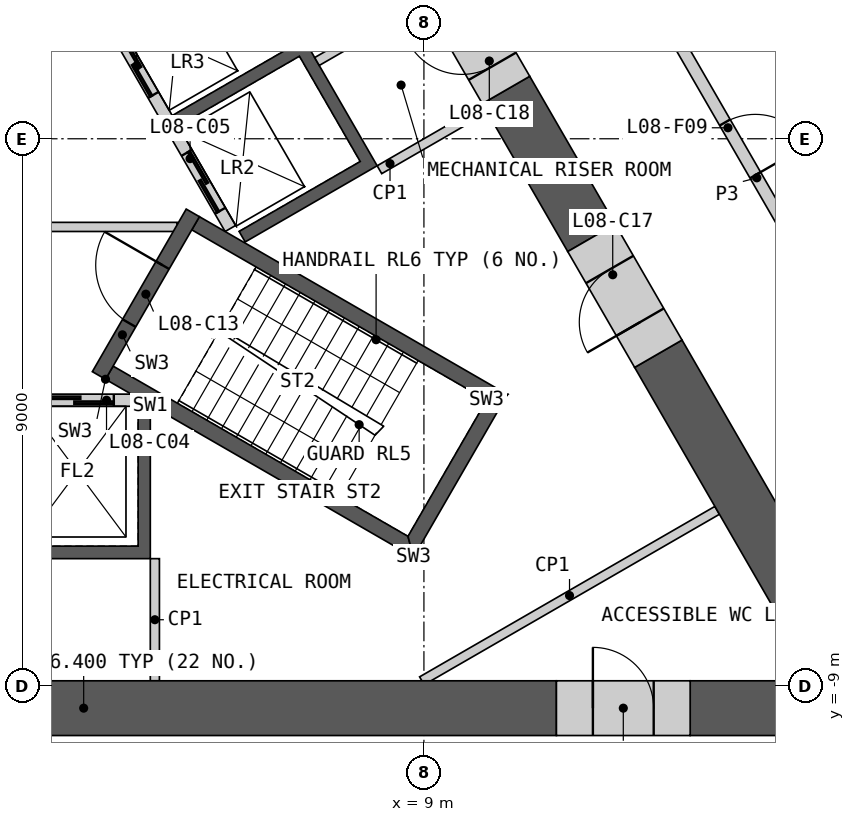
"""IFC4 building model, lengths in metres.
Left out: names, types, materials, properties, quantities, classifications, styles, units other than length and angle.
Written with IfcOpenShell. Run it as: python <this file> out.ifc"""

import sys

from ifc_helpers import new_model, si_unit, direction, frame, frame_2d, origin, place, context, subcontext, project, spatial, polyline, rectangle, outline, extrude, element, fill, save


model = new_model("IFC4")
c1 = context("Model", 3, precision=1e-05, world=origin(), true_north=direction((0.0, 1.0)))
c2 = subcontext(c1, "Body", "Model", "MODEL_VIEW")
j1 = project(units=[si_unit("LENGTHUNIT", "METRE"), si_unit("PLANEANGLEUNIT", "RADIAN")], contexts=[c1])
p1 = place(None, origin())
s1 = spatial("IfcSite", under=j1, at=p1, CompositionType="ELEMENT")
p2 = place(p1, origin())
s2 = spatial("IfcBuilding", under=s1, at=p2, CompositionType="ELEMENT")
p3 = place(p2, frame((0.0, 0.0, 42.6)))
s3 = spatial("IfcBuildingStorey", under=s2, at=p3, CompositionType="ELEMENT", Elevation=42.6)
p4 = place(p3, origin())
e1 = element("IfcWall", 1, at=p4, inside=s3, PredefinedType="SHEAR", context=c2, shape_type="SweptSolid", body=[
    extrude(outline(polyline([(4.5, -4.4), (4.5, -6.906), (-4.5, -6.906), (-4.5, -4.4), (-4.3, -4.4), (-4.3, -6.7), (-2.3, -6.7), (-2.3, -4.4), (-2.1, -4.4), (-2.1, -6.7), (-0.1, -6.7), (-0.1, -4.4), (0.1, -4.4), (0.1, -6.7), (2.1, -6.7), (2.1, -4.4), (2.3, -4.4), (2.3, -6.7), (4.3, -6.7), (4.3, -4.4), (4.5, -4.4)])), origin(), (0.0, 0.0, 1.0), 3.8),
])
p5 = place(p3, frame((-4.187, -4.3, 0.0), z_axis=(0.0, 0.0, 1.0), x_axis=(1.0, 0.0, 0.0)))
e2 = element("IfcWall", 2, at=p5, inside=s3, PredefinedType="SOLIDWALL", context=c2, shape_type="SweptSolid", body=[
    extrude(rectangle(XDim=8.373, YDim=0.2, at=frame_2d((4.187, 0.0))), origin(), (0.0, 0.0, 1.0), 3.8),
])
p6 = place(p5, frame((0.287, 0.0, 0.0)))
e3 = element("IfcOpeningElement", 3, at=p6, cuts=e2, PredefinedType="OPENING", context=c2, shape_type="SweptSolid", body=[
    extrude(rectangle(XDim=1.2, YDim=2.1, at=frame_2d((0.6, 1.05))), frame((0.0, 0.11, 0.0), z_axis=(0.0, -1.0, 0.0), x_axis=(1.0, 0.0, 0.0)), (0.0, 0.0, 1.0), 0.22),
])
p7 = place(p5, frame((2.387, 0.0, 0.0)))
e4 = element("IfcOpeningElement", 4, at=p7, cuts=e2, PredefinedType="OPENING", context=c2, shape_type="SweptSolid", body=[
    extrude(rectangle(XDim=1.4, YDim=2.1, at=frame_2d((0.7, 1.05))), frame((0.0, 0.11, 0.0), z_axis=(0.0, -1.0, 0.0), x_axis=(1.0, 0.0, 0.0)), (0.0, 0.0, 1.0), 0.22),
])
p8 = place(p5, frame((4.737, 0.0, 0.0)))
e5 = element("IfcOpeningElement", 5, at=p8, cuts=e2, PredefinedType="OPENING", context=c2, shape_type="SweptSolid", body=[
    extrude(rectangle(XDim=1.1, YDim=2.1, at=frame_2d((0.55, 1.05))), frame((0.0, 0.11, 0.0), z_axis=(0.0, -1.0, 0.0), x_axis=(1.0, 0.0, 0.0)), (0.0, 0.0, 1.0), 0.22),
])
p9 = place(p5, frame((6.887, 0.0, 0.0)))
e6 = element("IfcOpeningElement", 6, at=p9, cuts=e2, PredefinedType="OPENING", context=c2, shape_type="SweptSolid", body=[
    extrude(rectangle(XDim=1.2, YDim=2.1, at=frame_2d((0.6, 1.05))), frame((0.0, 0.11, 0.0), z_axis=(0.0, -1.0, 0.0), x_axis=(1.0, 0.0, 0.0)), (0.0, 0.0, 1.0), 0.22),
])
p10 = place(p3, origin())
e7 = element("IfcWall", 7, at=p10, inside=s3, PredefinedType="SHEAR", context=c2, shape_type="SweptSolid", body=[
    extrude(outline(polyline([(2.66, 4.192), (4.831, 5.445), (8.231, -0.444), (6.061, -1.697), (5.96, -1.524), (7.952, -0.374), (6.952, 1.358), (4.96, 0.208), (4.861, 0.381), (6.852, 1.531), (5.852, 3.263), (3.861, 2.113), (3.76, 2.287), (5.752, 3.437), (4.752, 5.169), (2.76, 4.019), (2.66, 4.192)])), origin(), (0.0, 0.0, 1.0), 3.8),
])
p11 = place(p3, frame((5.817, -1.476, 0.0), z_axis=(0.0, 0.0, 1.0), x_axis=(-0.500002616675, 0.866023893041, 0.0)))
e8 = element("IfcWall", 8, at=p11, inside=s3, PredefinedType="SOLIDWALL", context=c2, shape_type="SweptSolid", body=[
    extrude(rectangle(XDim=8.373, YDim=0.2, at=frame_2d((4.187, 0.0))), origin(), (0.0, 0.0, 1.0), 3.8),
])
p12 = place(p11, frame((0.337, 0.0, 0.0)))
e9 = element("IfcOpeningElement", 9, at=p12, cuts=e8, PredefinedType="OPENING", context=c2, shape_type="SweptSolid", body=[
    extrude(rectangle(XDim=1.1, YDim=2.1, at=frame_2d((0.55, 1.05))), frame((0.0, 0.11, 0.0), z_axis=(0.0, -1.0, 0.0), x_axis=(1.0, 0.0, 0.0)), (0.0, 0.0, 1.0), 0.22),
])
p13 = place(p11, frame((2.537, 0.0, 0.0)))
e10 = element("IfcOpeningElement", 10, at=p13, cuts=e8, PredefinedType="OPENING", context=c2, shape_type="SweptSolid", body=[
    extrude(rectangle(XDim=1.1, YDim=2.1, at=frame_2d((0.55, 1.05))), frame((0.0, 0.11, 0.0), z_axis=(0.0, -1.0, 0.0), x_axis=(1.0, 0.0, 0.0)), (0.0, 0.0, 1.0), 0.22),
])
p14 = place(p11, frame((4.737, 0.0, 0.0)))
e11 = element("IfcOpeningElement", 11, at=p14, cuts=e8, PredefinedType="OPENING", context=c2, shape_type="SweptSolid", body=[
    extrude(rectangle(XDim=1.1, YDim=2.1, at=frame_2d((0.55, 1.05))), frame((0.0, 0.11, 0.0), z_axis=(0.0, -1.0, 0.0), x_axis=(1.0, 0.0, 0.0)), (0.0, 0.0, 1.0), 0.22),
])
p15 = place(p11, frame((7.037, 0.0, 0.0)))
e12 = element("IfcOpeningElement", 12, at=p15, cuts=e8, PredefinedType="OPENING", context=c2, shape_type="SweptSolid", body=[
    extrude(rectangle(XDim=0.9, YDim=2.1, at=frame_2d((0.45, 1.05))), frame((0.0, 0.11, 0.0), z_axis=(0.0, -1.0, 0.0), x_axis=(1.0, 0.0, 0.0)), (0.0, 0.0, 1.0), 0.22),
])
p16 = place(p3, frame((-4.941, -1.45, 0.0), z_axis=(0.0, 0.0, 1.0), x_axis=(1.0, 0.0, 0.0)))
e13 = element("IfcWall", 13, at=p16, inside=s3, PredefinedType="PARTITIONING", context=c2, shape_type="SweptSolid", body=[
    extrude(rectangle(XDim=9.882, YDim=0.15, at=frame_2d((4.941, 0.0))), origin(), (0.0, 0.0, 1.0), 3.8),
])
p17 = place(p16, frame((4.391, 0.0, 0.0)))
e14 = element("IfcOpeningElement", 14, at=p17, cuts=e13, PredefinedType="OPENING", context=c2, shape_type="SweptSolid", body=[
    extrude(rectangle(XDim=1.1, YDim=2.1, at=frame_2d((0.55, 1.05))), frame((0.0, 0.085, 0.0), z_axis=(0.0, -1.0, 0.0), x_axis=(1.0, 0.0, 0.0)), (0.0, 0.0, 1.0), 0.17),
])
p18 = place(p3, origin())
e15 = element("IfcWall", 15, at=p18, inside=s3, PredefinedType="SHEAR", context=c2, shape_type="SweptSolid", body=[
    extrude(outline(polyline([(3.763, -3.956), (8.83, -6.881), (8.738, -6.539), (3.888, -3.739), (3.763, -3.956)])), origin(), (0.0, 0.0, 1.0), 3.8),
])
p19 = place(p3, origin())
e16 = element("IfcWall", 16, at=p19, inside=s3, PredefinedType="SHEAR", context=c2, shape_type="SweptSolid", body=[
    extrude(outline(polyline([(8.83, -6.881), (10.374, -4.206), (10.032, -4.298), (8.738, -6.539), (8.83, -6.881)])), origin(), (0.0, 0.0, 1.0), 3.8),
])
p20 = place(p3, origin())
e17 = element("IfcWall", 17, at=p20, inside=s3, PredefinedType="SHEAR", context=c2, shape_type="SweptSolid", body=[
    extrude(outline(polyline([(10.032, -4.298), (10.374, -4.206), (5.307, -1.281), (5.182, -1.498), (10.032, -4.298)])), origin(), (0.0, 0.0, 1.0), 3.8),
])
p21 = place(p3, frame((3.655, -3.893, 0.0), z_axis=(0.0, 0.0, 1.0), x_axis=(0.499982516597, 0.866035497597, 0.0)))
e18 = element("IfcWall", 18, at=p21, inside=s3, PredefinedType="SHEAR", context=c2, shape_type="SweptSolid", body=[
    extrude(rectangle(XDim=3.088, YDim=0.25, at=frame_2d((1.544, 0.0))), origin(), (0.0, 0.0, 1.0), 3.8),
])
p22 = place(p21, frame((0.994, 0.0, 0.0)))
e19 = element("IfcOpeningElement", 19, at=p22, cuts=e18, PredefinedType="OPENING", context=c2, shape_type="SweptSolid", body=[
    extrude(rectangle(XDim=1.1, YDim=2.1, at=frame_2d((0.55, 1.05))), frame((0.0, 0.135, 0.0), z_axis=(0.0, -1.0, 0.0), x_axis=(1.0, 0.0, 0.0)), (0.0, 0.0, 1.0), 0.27),
])
p23 = place(p3, frame((4.575, -6.906, 0.0), z_axis=(0.0, 0.0, 1.0), x_axis=(0.0, -1.0, 0.0)))
e20 = element("IfcWall", 20, at=p23, inside=s3, PredefinedType="PARTITIONING", context=c2, shape_type="SweptSolid", body=[
    extrude(rectangle(XDim=2.009, YDim=0.15, at=frame_2d((1.004, 0.0))), origin(), (0.0, 0.0, 1.0), 3.8),
])
p24 = place(p3, frame((8.268, -0.509, 0.0), z_axis=(0.0, 0.0, 1.0), x_axis=(0.866035824272, 0.499981950752, 0.0)))
e21 = element("IfcWall", 21, at=p24, inside=s3, PredefinedType="PARTITIONING", context=c2, shape_type="SweptSolid", body=[
    extrude(rectangle(XDim=2.009, YDim=0.15, at=frame_2d((1.004, 0.0))), origin(), (0.0, 0.0, 1.0), 3.8),
])
p25 = place(p3, frame((13.823, -6.111, 0.0), z_axis=(0.0, 0.0, 1.0), x_axis=(-0.866026802741, -0.499997576928, 0.0)))
e22 = element("IfcWall", 22, at=p25, inside=s3, PredefinedType="PARTITIONING", context=c2, shape_type="SweptSolid", body=[
    extrude(rectangle(XDim=5.607, YDim=0.15, at=frame_2d((2.804, 0.0))), origin(), (0.0, 0.0, 1.0), 3.8),
])
p26 = place(p3, frame((8.981, 2.275, 0.0), z_axis=(0.0, 0.0, 1.0), x_axis=(-0.866013584312, -0.500020471368, 0.0)))
e23 = element("IfcWall", 23, at=p26, inside=s3, PredefinedType="PARTITIONING", context=c2, shape_type="SweptSolid", body=[
    extrude(rectangle(XDim=2.009, YDim=0.15, at=frame_2d((1.005, 0.0))), origin(), (0.0, 0.0, 1.0), 3.8),
])
p27 = place(p3, frame((-4.371, -9.365, 0.0), z_axis=(0.0, 0.0, 1.0), x_axis=(1.0, 0.0, 0.0)))
e24 = element("IfcWall", 24, at=p27, inside=s3, PredefinedType="SHEAR", context=c2, shape_type="SweptSolid", body=[
    extrude(rectangle(XDim=15.55, YDim=0.9, at=frame_2d((7.775, 0.0))), origin(), (0.0, 0.0, 1.0), 3.8),
])
p28 = place(p3, frame((13.379, -9.365, 0.0), z_axis=(0.0, 0.0, 1.0), x_axis=(1.0, 0.0, 0.0)))
e25 = element("IfcWall", 25, at=p28, inside=s3, PredefinedType="SHEAR", context=c2, shape_type="SweptSolid", body=[
    extrude(rectangle(XDim=2.062, YDim=0.9, at=frame_2d((1.031, 0.0))), origin(), (0.0, 0.0, 1.0), 3.8),
])
p29 = place(p3, frame((15.831, -8.69, 0.0), z_axis=(0.0, 0.0, 1.0), x_axis=(-0.499999419053, 0.866025739194, 0.0)))
e26 = element("IfcWall", 26, at=p29, inside=s3, PredefinedType="SHEAR", context=c2, shape_type="SweptSolid", body=[
    extrude(rectangle(XDim=5.952, YDim=0.9, at=frame_2d((2.976, 0.0))), origin(), (0.0, 0.0, 1.0), 3.8),
])
p30 = place(p3, frame((11.755, -1.63, 0.0), z_axis=(0.0, 0.0, 1.0), x_axis=(-0.499943114462, 0.866058244174, 0.0)))
e27 = element("IfcWall", 27, at=p30, inside=s3, PredefinedType="SHEAR", context=c2, shape_type="SweptSolid", body=[
    extrude(rectangle(XDim=2.809, YDim=0.9, at=frame_2d((1.405, 0.0))), origin(), (0.0, 0.0, 1.0), 3.8),
])
p31 = place(p3, frame((11.179, -9.365, 0.0), z_axis=(0.0, 0.0, 1.0), x_axis=(1.0, 0.0, 0.0)))
e28 = element("IfcWall", 28, at=p31, inside=s3, PredefinedType="SHEAR", context=c2, shape_type="SweptSolid", body=[
    extrude(rectangle(XDim=2.2, YDim=0.9, at=frame_2d((1.1, 0.0))), origin(), (0.0, 0.0, 1.0), 3.8),
])
p32 = place(p31, frame((0.6, 0.0, 0.0)))
e29 = element("IfcOpeningElement", 29, at=p32, cuts=e28, PredefinedType="OPENING", context=c2, shape_type="SweptSolid", body=[
    extrude(rectangle(XDim=1.0, YDim=2.1, at=frame_2d((0.5, 1.05))), frame((0.0, 0.46, 0.0), z_axis=(0.0, -1.0, 0.0), x_axis=(1.0, 0.0, 0.0)), (0.0, 0.0, 1.0), 0.92),
])
p33 = place(p3, frame((12.855, -3.536, 0.0), z_axis=(0.0, 0.0, 1.0), x_axis=(-0.50002983664, 0.866008176907, 0.0)))
e30 = element("IfcWall", 30, at=p33, inside=s3, PredefinedType="SHEAR", context=c2, shape_type="SweptSolid", body=[
    extrude(rectangle(XDim=2.2, YDim=0.9, at=frame_2d((1.1, 0.0))), origin(), (0.0, 0.0, 1.0), 3.8),
])
p34 = place(p33, frame((0.6, 0.0, 0.0)))
e31 = element("IfcOpeningElement", 31, at=p34, cuts=e30, PredefinedType="OPENING", context=c2, shape_type="SweptSolid", body=[
    extrude(rectangle(XDim=1.0, YDim=2.1, at=frame_2d((0.5, 1.05))), frame((0.0, 0.46, 0.0), z_axis=(0.0, -1.0, 0.0), x_axis=(1.0, 0.0, 0.0)), (0.0, 0.0, 1.0), 0.92),
])
p35 = place(p3, frame((10.35, 0.803, 0.0), z_axis=(0.0, 0.0, 1.0), x_axis=(-0.500081290722, 0.865978465477, 0.0)))
e32 = element("IfcWall", 32, at=p35, inside=s3, PredefinedType="SHEAR", context=c2, shape_type="SweptSolid", body=[
    extrude(rectangle(XDim=1.865, YDim=0.9, at=frame_2d((0.933, 0.0))), origin(), (0.0, 0.0, 1.0), 3.8),
])
p36 = place(p35, frame((0.45, 0.0, 0.0)))
e33 = element("IfcOpeningElement", 33, at=p36, cuts=e32, PredefinedType="OPENING", context=c2, shape_type="SweptSolid", body=[
    extrude(rectangle(XDim=1.0, YDim=2.1, at=frame_2d((0.5, 1.05))), frame((0.0, 0.46, 0.0), z_axis=(0.0, -1.0, 0.0), x_axis=(1.0, 0.0, 0.0)), (0.0, 0.0, 1.0), 0.92),
])
p37 = place(p3, frame((10.719, 5.865, 0.0), z_axis=(0.0, 0.0, 1.0), x_axis=(0.49999175339, -0.866030164915, 0.0)))
e34 = element("IfcWall", 34, at=p37, inside=s3, PredefinedType="PARTITIONING", context=c2, shape_type="SweptSolid", body=[
    extrude(rectangle(XDim=10.019, YDim=0.2, at=frame_2d((5.009, 0.0))), origin(), (0.0, 0.0, 1.0), 3.8),
])
p38 = place(p37, frame((6.464, 0.0, 0.0)))
e35 = element("IfcOpeningElement", 35, at=p38, cuts=e34, PredefinedType="OPENING", context=c2, shape_type="SweptSolid", body=[
    extrude(rectangle(XDim=1.0, YDim=2.1, at=frame_2d((0.5, 1.05))), frame((0.0, 0.11, 0.0), z_axis=(0.0, -1.0, 0.0), x_axis=(1.0, 0.0, 0.0)), (0.0, 0.0, 1.0), 0.22),
])
p39 = place(p37, frame((1.753, 0.0, 0.0)))
e36 = element("IfcOpeningElement", 36, at=p39, cuts=e34, PredefinedType="OPENING", context=c2, shape_type="SweptSolid", body=[
    extrude(rectangle(XDim=1.0, YDim=2.1, at=frame_2d((0.5, 1.05))), frame((0.0, 0.11, 0.0), z_axis=(0.0, -1.0, 0.0), x_axis=(1.0, 0.0, 0.0)), (0.0, 0.0, 1.0), 0.22),
])
p40 = place(p9, origin())
e37 = element("IfcDoor", 37, at=p40, inside=s3, OperationType="SLIDING_TO_LEFT", PredefinedType="DOOR", context=c2, shape_type="SweptSolid", body=[
    extrude(rectangle(XDim=1.2, YDim=2.1, at=frame_2d((0.6, 1.05))), frame((0.0, 0.025, 0.0), z_axis=(0.0, -1.0, 0.0), x_axis=(1.0, 0.0, 0.0)), (0.0, 0.0, 1.0), 0.05),
])
fill(e6, e37)
p41 = place(p12, origin())
e38 = element("IfcDoor", 38, at=p41, inside=s3, OperationType="SLIDING_TO_LEFT", PredefinedType="DOOR", context=c2, shape_type="SweptSolid", body=[
    extrude(rectangle(XDim=1.1, YDim=2.1, at=frame_2d((0.55, 1.05))), frame((0.0, 0.025, 0.0), z_axis=(0.0, -1.0, 0.0), x_axis=(1.0, 0.0, 0.0)), (0.0, 0.0, 1.0), 0.05),
])
fill(e9, e38)
p42 = place(p13, origin())
e39 = element("IfcDoor", 39, at=p42, inside=s3, OperationType="SLIDING_TO_LEFT", PredefinedType="DOOR", context=c2, shape_type="SweptSolid", body=[
    extrude(rectangle(XDim=1.1, YDim=2.1, at=frame_2d((0.55, 1.05))), frame((0.0, 0.025, 0.0), z_axis=(0.0, -1.0, 0.0), x_axis=(1.0, 0.0, 0.0)), (0.0, 0.0, 1.0), 0.05),
])
fill(e10, e39)
p43 = place(p22, origin())
e40 = element("IfcDoor", 40, at=p43, inside=s3, OperationType="SINGLE_SWING_RIGHT", PredefinedType="DOOR", context=c2, shape_type="SweptSolid", body=[
    extrude(rectangle(XDim=1.1, YDim=2.1, at=frame_2d((0.55, 1.05))), frame((0.0, 0.025, 0.0), z_axis=(0.0, -1.0, 0.0), x_axis=(1.0, 0.0, 0.0)), (0.0, 0.0, 1.0), 0.05),
])
fill(e19, e40)
p44 = place(p32, origin())
e41 = element("IfcDoor", 41, at=p44, inside=s3, OperationType="SINGLE_SWING_LEFT", PredefinedType="DOOR", context=c2, shape_type="SweptSolid", body=[
    extrude(rectangle(XDim=1.0, YDim=2.1, at=frame_2d((0.5, 1.05))), frame((0.0, 0.205, 0.0), z_axis=(0.0, -1.0, 0.0), x_axis=(1.0, 0.0, 0.0)), (0.0, 0.0, 1.0), 0.05),
])
fill(e29, e41)
p45 = place(p34, origin())
e42 = element("IfcDoor", 42, at=p45, inside=s3, OperationType="SINGLE_SWING_LEFT", PredefinedType="DOOR", context=c2, shape_type="SweptSolid", body=[
    extrude(rectangle(XDim=1.0, YDim=2.1, at=frame_2d((0.5, 1.05))), frame((0.0, 0.205, 0.0), z_axis=(0.0, -1.0, 0.0), x_axis=(1.0, 0.0, 0.0)), (0.0, 0.0, 1.0), 0.05),
])
fill(e31, e42)
p46 = place(p36, origin())
e43 = element("IfcDoor", 43, at=p46, inside=s3, OperationType="SINGLE_SWING_RIGHT", PredefinedType="DOOR", context=c2, shape_type="SweptSolid", body=[
    extrude(rectangle(XDim=1.0, YDim=2.1, at=frame_2d((0.5, 1.05))), frame((0.0, 0.205, 0.0), z_axis=(0.0, -1.0, 0.0), x_axis=(1.0, 0.0, 0.0)), (0.0, 0.0, 1.0), 0.05),
])
fill(e33, e43)
p47 = place(p38, origin())
e44 = element("IfcDoor", 44, at=p47, inside=s3, OperationType="SINGLE_SWING_RIGHT", PredefinedType="DOOR", context=c2, shape_type="SweptSolid", body=[
    extrude(rectangle(XDim=1.0, YDim=2.1, at=frame_2d((0.5, 1.05))), frame((0.0, 0.025, 0.0), z_axis=(0.0, -1.0, 0.0), x_axis=(1.0, 0.0, 0.0)), (0.0, 0.0, 1.0), 0.05),
])
fill(e35, e44)
save(model, sys.argv[1])
